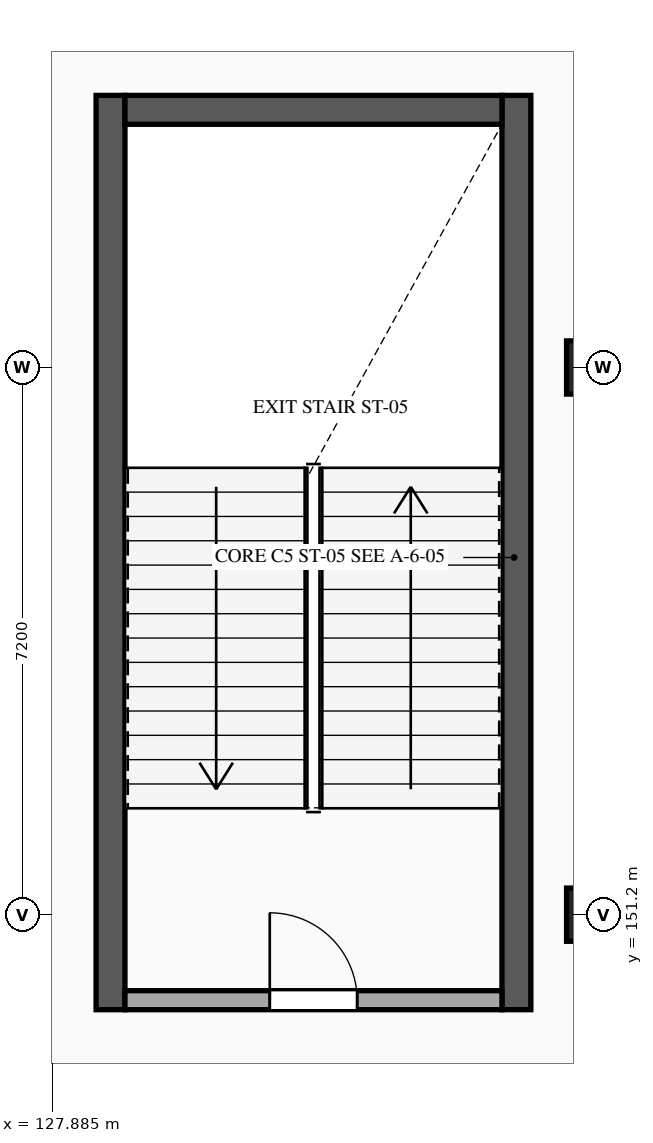
"""IFC4 building model, lengths in metres.
Left out: names, types, materials, properties, quantities, classifications, styles, units other than length and angle.
Written with IfcOpenShell. Run it as: python <this file> out.ifc"""

import sys

from ifc_helpers import new_model, si_unit, direction, frame, frame_2d, origin, origin_2d, place, context, subcontext, project, spatial, rectangle, extrude, element, fill, save


model = new_model("IFC4")
c1 = context("Model", 3, precision=1e-05, world=origin(), true_north=direction((0.0, 1.0)))
c2 = subcontext(c1, "Body", "Model", "MODEL_VIEW")
j1 = project(units=[si_unit("LENGTHUNIT", "METRE"), si_unit("PLANEANGLEUNIT", "RADIAN")], contexts=[c1])
p1 = place(None, origin())
s1 = spatial("IfcSite", under=j1, at=p1, CompositionType="ELEMENT")
p2 = place(p1, origin())
s2 = spatial("IfcBuilding", under=s1, at=p2, CompositionType="ELEMENT")
p3 = place(p2, frame((0.0, 0.0, 10.8)))
s3 = spatial("IfcBuildingStorey", under=s2, at=p3, CompositionType="ELEMENT", Elevation=10.8)
for number, where, z_axis, x_axis in (
    (1, (135.0, 151.2, 0.0), (0.0, 0.0, 1.0), (1.0, 0.0, 0.0)),
    (2, (135.0, 158.4, 0.0), (0.0, 0.0, 1.0), (1.0, 0.0, 0.0)),
):
    element("IfcColumn", number, at=place(p3, frame(where, z_axis=z_axis, x_axis=x_axis)), inside=s3, PredefinedType="COLUMN", context=c2, shape_type="SweptSolid", body=[
        extrude(rectangle(XDim=0.7, YDim=0.7, at=origin_2d()), origin(), (0.0, 0.0, 1.0), 4.5),
    ])
for number, where, z_axis, x_axis in (
    (3, (128.65, 149.95, 0.0), (0.0, 0.0, 1.0), (0.0, 1.0, 0.0)),
    (4, (133.99, 161.98, 0.0), (0.0, 0.0, 1.0), (0.0, -1.0, 0.0)),
):
    element("IfcWall", number, at=place(p3, frame(where, z_axis=z_axis, x_axis=x_axis)), inside=s3, PredefinedType="SHEAR", context=c2, shape_type="SweptSolid", body=[
        extrude(rectangle(XDim=12.03, YDim=0.38, at=frame_2d((6.015, 0.0))), origin(), (0.0, 0.0, 1.0), 4.25),
    ])
p4 = place(p3, frame((128.84, 161.79, 0.0), z_axis=(0.0, 0.0, 1.0), x_axis=(1.0, 0.0, 0.0)))
e5 = element("IfcWall", 5, at=p4, inside=s3, PredefinedType="SHEAR", context=c2, shape_type="SweptSolid", body=[
    extrude(rectangle(XDim=4.96, YDim=0.38, at=frame_2d((2.48, 0.0))), origin(), (0.0, 0.0, 1.0), 4.25),
])
p5 = place(p3, frame((128.84, 150.075, 0.0), z_axis=(0.0, 0.0, 1.0), x_axis=(1.0, 0.0, 0.0)))
e6 = element("IfcWall", 6, at=p5, inside=s3, PredefinedType="STANDARD", context=c2, shape_type="SweptSolid", body=[
    extrude(rectangle(XDim=4.96, YDim=0.25, at=frame_2d((2.48, 0.0))), origin(), (0.0, 0.0, 1.0), 4.22),
])
p6 = place(p5, frame((1.905, 0.0, 0.0)))
e7 = element("IfcOpeningElement", 7, at=p6, cuts=e6, PredefinedType="OPENING", context=c2, shape_type="SweptSolid", body=[
    extrude(rectangle(XDim=1.15, YDim=2.2, at=frame_2d((0.575, 1.1))), frame((0.0, 0.135, 0.0), z_axis=(0.0, -1.0, 0.0), x_axis=(1.0, 0.0, 0.0)), (0.0, 0.0, 1.0), 0.27),
])
p7 = place(p6, origin())
e8 = element("IfcDoor", 8, at=p7, inside=s3, OperationType="SINGLE_SWING_LEFT", PredefinedType="DOOR", context=c2, shape_type="SweptSolid", body=[
    extrude(rectangle(XDim=1.15, YDim=2.2, at=frame_2d((0.575, 1.1))), frame((0.0, 0.025, 0.0), z_axis=(0.0, -1.0, 0.0), x_axis=(1.0, 0.0, 0.0)), (0.0, 0.0, 1.0), 0.05),
])
fill(e7, e8)
save(model, sys.argv[1])
